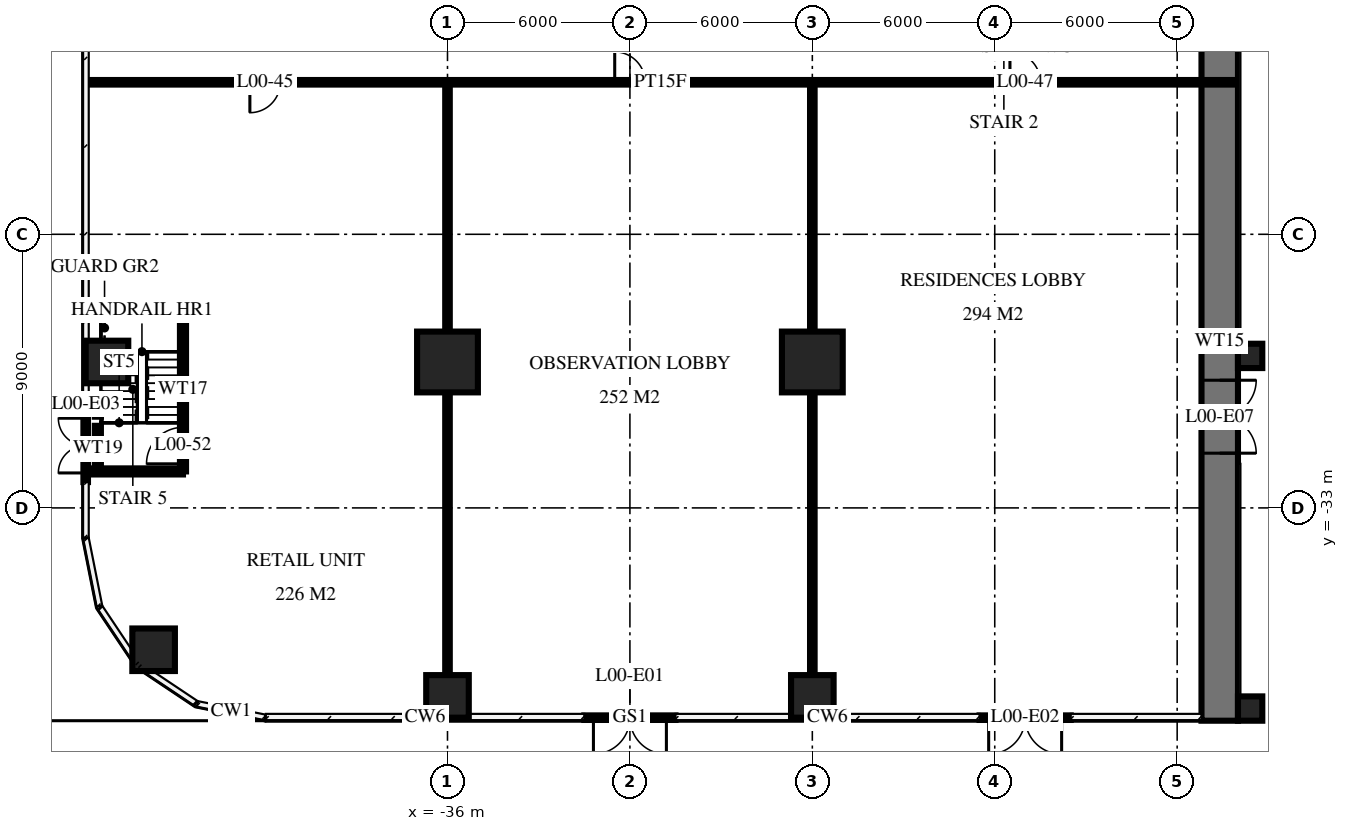
"""IFC4 building model, lengths in metres.
Left out: names, types, materials, properties, quantities, classifications, styles, units other than length and angle.
Written with IfcOpenShell. Run it as: python <this file> out.ifc"""

import sys

from ifc_helpers import new_model, si_unit, direction, frame, frame_2d, origin, origin_2d, place, context, subcontext, project, spatial, rectangle, circle, extrude, element, fill, save


model = new_model("IFC4")
c1 = context("Model", 3, precision=1e-05, world=origin(), true_north=direction((0.0, 1.0)))
c2 = subcontext(c1, "Body", "Model", "MODEL_VIEW")
j1 = project(units=[si_unit("LENGTHUNIT", "METRE"), si_unit("PLANEANGLEUNIT", "RADIAN")], contexts=[c1])
p1 = place(None, origin())
s1 = spatial("IfcSite", under=j1, at=p1, CompositionType="ELEMENT")
p2 = place(p1, origin())
s2 = spatial("IfcBuilding", under=s1, at=p2, CompositionType="ELEMENT")
p3 = place(p2, origin())
s3 = spatial("IfcBuildingStorey", under=s2, at=p3, CompositionType="ELEMENT", Elevation=0.0)
for number, where, z_axis, x_axis in (
    (1, (-47.2, -28.2, -0.3), (0.0, 0.0, 1.0), (1.0, 0.0, 0.0)),
    (2, (-45.666, -37.666, -0.3), (0.0, 0.0, 1.0), (1.0, 0.0, 0.0)),
    (3, (-36.0, -39.2, -0.3), (0.0, 0.0, 1.0), (1.0, 0.0, 0.0)),
):
    element("IfcColumn", number, at=place(p3, frame(where, z_axis=z_axis, x_axis=x_axis)), inside=s3, PredefinedType="COLUMN", context=c2, shape_type="SweptSolid", body=[
        extrude(circle(Radius=0.7, at=origin_2d()), origin(), (0.0, 0.0, 1.0), 7.3),
    ])
p4 = place(p3, frame((-36.0, -28.2, -0.3), z_axis=(0.0, 0.0, 1.0), x_axis=(1.0, 0.0, 0.0)))
e4 = element("IfcColumn", 4, at=p4, inside=s3, PredefinedType="COLUMN", context=c2, shape_type="SweptSolid", body=[
    extrude(circle(Radius=1.0, at=origin_2d()), origin(), (0.0, 0.0, 1.0), 7.3),
])
p5 = place(p3, frame((-24.0, -39.2, -0.3), z_axis=(0.0, 0.0, 1.0), x_axis=(1.0, 0.0, 0.0)))
e5 = element("IfcColumn", 5, at=p5, inside=s3, PredefinedType="COLUMN", context=c2, shape_type="SweptSolid", body=[
    extrude(circle(Radius=0.7, at=origin_2d()), origin(), (0.0, 0.0, 1.0), 7.3),
])
p6 = place(p3, frame((-24.0, -28.2, -0.3), z_axis=(0.0, 0.0, 1.0), x_axis=(1.0, 0.0, 0.0)))
e6 = element("IfcColumn", 6, at=p6, inside=s3, PredefinedType="COLUMN", context=c2, shape_type="SweptSolid", body=[
    extrude(circle(Radius=1.0, at=origin_2d()), origin(), (0.0, 0.0, 1.0), 7.3),
])
p7 = place(p3, frame((-10.6, -40.0, -0.3), z_axis=(0.0, 0.0, 1.0), x_axis=(0.0, 1.0, 0.0)))
e7 = element("IfcWall", 7, at=p7, inside=s3, PredefinedType="SHEAR", context=c2, shape_type="SweptSolid", body=[
    extrude(rectangle(XDim=25.0, YDim=1.2, at=frame_2d((12.5, 0.0))), origin(), (0.0, 0.0, 1.0), 7.3),
])
p8 = place(p7, frame((8.8, 0.0, 0.3)))
e8 = element("IfcOpeningElement", 8, at=p8, cuts=e7, PredefinedType="OPENING", context=c2, shape_type="SweptSolid", body=[
    extrude(rectangle(XDim=2.4, YDim=2.7, at=frame_2d((1.2, 1.35))), frame((0.0, 0.61, 0.0), z_axis=(0.0, -1.0, 0.0), x_axis=(1.0, 0.0, 0.0)), (0.0, 0.0, 1.0), 1.22),
])
for number, where, z_axis, x_axis in (
    (9, (-9.6, -39.6, -0.3), (0.0, 0.0, 1.0), (1.0, 0.0, 0.0)),
    (10, (-9.6, -28.0, -0.3), (0.0, 0.0, 1.0), (1.0, 0.0, 0.0)),
):
    element("IfcColumn", number, at=place(p3, frame(where, z_axis=z_axis, x_axis=x_axis)), inside=s3, PredefinedType="COLUMN", context=c2, shape_type="SweptSolid", body=[
        extrude(rectangle(XDim=0.8, YDim=0.8, at=origin_2d()), origin(), (0.0, 0.0, 1.0), 7.3),
    ])
p9 = place(p3, frame((-31.5, -39.9, 0.0), z_axis=(0.0, 0.0, 1.0), x_axis=(1.0, 0.0, 0.0)))
e11 = element("IfcWall", 11, at=p9, inside=s3, PredefinedType="USERDEFINED", context=c2, shape_type="SweptSolid", body=[
    extrude(rectangle(XDim=3.0, YDim=0.15, at=frame_2d((1.5, 0.0))), origin(), (0.0, 0.0, 1.0), 6.55),
])
p10 = place(p9, frame((0.3, 0.0, 0.0)))
e12 = element("IfcOpeningElement", 12, at=p10, cuts=e11, PredefinedType="OPENING", context=c2, shape_type="SweptSolid", body=[
    extrude(rectangle(XDim=2.4, YDim=2.7, at=frame_2d((1.2, 1.35))), frame((0.0, 0.085, 0.0), z_axis=(0.0, -1.0, 0.0), x_axis=(1.0, 0.0, 0.0)), (0.0, 0.0, 1.0), 0.17),
])
p11 = place(p3, frame((-18.5, -39.9, 0.0), z_axis=(0.0, 0.0, 1.0), x_axis=(1.0, 0.0, 0.0)))
e13 = element("IfcWall", 13, at=p11, inside=s3, PredefinedType="USERDEFINED", context=c2, shape_type="SweptSolid", body=[
    extrude(rectangle(XDim=3.0, YDim=0.15, at=frame_2d((1.5, 0.0))), origin(), (0.0, 0.0, 1.0), 6.55),
])
p12 = place(p11, frame((0.3, 0.0, 0.0)))
e14 = element("IfcOpeningElement", 14, at=p12, cuts=e13, PredefinedType="OPENING", context=c2, shape_type="SweptSolid", body=[
    extrude(rectangle(XDim=2.4, YDim=2.7, at=frame_2d((1.2, 1.35))), frame((0.0, 0.085, 0.0), z_axis=(0.0, -1.0, 0.0), x_axis=(1.0, 0.0, 0.0)), (0.0, 0.0, 1.0), 0.17),
])
p13 = place(p3, frame((-47.9, -29.75, 0.0), z_axis=(0.0, 0.0, 1.0), x_axis=(0.0, -1.0, 0.0)))
e15 = element("IfcWall", 15, at=p13, inside=s3, PredefinedType="USERDEFINED", context=c2, shape_type="SweptSolid", body=[
    extrude(rectangle(XDim=2.4, YDim=0.15, at=frame_2d((1.2, 0.0))), origin(), (0.0, 0.0, 1.0), 6.55),
])
p14 = place(p13, frame((0.3, 0.0, 0.0)))
e16 = element("IfcOpeningElement", 16, at=p14, cuts=e15, PredefinedType="OPENING", context=c2, shape_type="SweptSolid", body=[
    extrude(rectangle(XDim=1.8, YDim=2.4, at=frame_2d((0.9, 1.2))), frame((0.0, 0.085, 0.0), z_axis=(0.0, -1.0, 0.0), x_axis=(1.0, 0.0, 0.0)), (0.0, 0.0, 1.0), 0.17),
])
for number, where, z_axis, x_axis in (
    (17, (-24.0, -39.82, 0.0), (0.0, 0.0, 1.0), (0.0, 1.0, 0.0)),
    (18, (-36.0, -39.82, 0.0), (0.0, 0.0, 1.0), (0.0, 1.0, 0.0)),
):
    element("IfcWall", number, at=place(p3, frame(where, z_axis=z_axis, x_axis=x_axis)), inside=s3, PredefinedType="PARTITIONING", context=c2, shape_type="SweptSolid", body=[
        extrude(rectangle(XDim=20.82, YDim=0.15, at=frame_2d((10.41, 0.0))), origin(), (0.0, 0.0, 1.0), 6.55),
    ])
p15 = place(p3, frame((-44.7, -31.8, 0.0), z_axis=(0.0, 0.0, 1.0), x_axis=(0.0, 1.0, 0.0)))
e19 = element("IfcWall", 19, at=p15, inside=s3, PredefinedType="SHEAR", context=c2, shape_type="SweptSolid", body=[
    extrude(rectangle(XDim=5.4, YDim=0.2, at=frame_2d((2.7, 0.0))), origin(), (0.0, 0.0, 1.0), 6.55),
])
p16 = place(p15, frame((0.25, 0.0, 0.0)))
e20 = element("IfcOpeningElement", 20, at=p16, cuts=e19, PredefinedType="OPENING", context=c2, shape_type="SweptSolid", body=[
    extrude(rectangle(XDim=1.2, YDim=2.1, at=frame_2d((0.6, 1.05))), frame((0.0, 0.11, 0.0), z_axis=(0.0, -1.0, 0.0), x_axis=(1.0, 0.0, 0.0)), (0.0, 0.0, 1.0), 0.22),
])
for number, where, z_axis, x_axis in (
    (21, (-47.82, -31.8, 0.0), (0.0, 0.0, 1.0), (1.0, 0.0, 0.0)),
    (22, (-47.82, -26.4, 0.0), (0.0, 0.0, 1.0), (1.0, 0.0, 0.0)),
):
    element("IfcWall", number, at=place(p3, frame(where, z_axis=z_axis, x_axis=x_axis)), inside=s3, PredefinedType="SHEAR", context=c2, shape_type="SweptSolid", body=[
        extrude(rectangle(XDim=3.12, YDim=0.2, at=frame_2d((1.56, 0.0))), origin(), (0.0, 0.0, 1.0), 6.55),
    ])
p17 = place(p3, frame((-47.82, -19.0, 0.0), z_axis=(0.0, 0.0, 1.0), x_axis=(1.0, 0.0, 0.0)))
e23 = element("IfcWall", 23, at=p17, inside=s3, PredefinedType="PARTITIONING", context=c2, shape_type="SweptSolid", body=[
    extrude(rectangle(XDim=37.64, YDim=0.15, at=frame_2d((18.82, 0.0))), origin(), (0.0, 0.0, 1.0), 6.55),
])
p18 = place(p17, frame((5.32, 0.0, 0.0)))
e24 = element("IfcOpeningElement", 24, at=p18, cuts=e23, PredefinedType="OPENING", context=c2, shape_type="SweptSolid", body=[
    extrude(rectangle(XDim=1.0, YDim=2.1, at=frame_2d((0.5, 1.05))), frame((0.0, 0.085, 0.0), z_axis=(0.0, -1.0, 0.0), x_axis=(1.0, 0.0, 0.0)), (0.0, 0.0, 1.0), 0.17),
])
p19 = place(p17, frame((17.32, 0.0, 0.0)))
e25 = element("IfcOpeningElement", 25, at=p19, cuts=e23, PredefinedType="OPENING", context=c2, shape_type="SweptSolid", body=[
    extrude(rectangle(XDim=1.0, YDim=2.1, at=frame_2d((0.5, 1.05))), frame((0.0, 0.085, 0.0), z_axis=(0.0, -1.0, 0.0), x_axis=(1.0, 0.0, 0.0)), (0.0, 0.0, 1.0), 0.17),
])
p20 = place(p17, frame((30.32, 0.0, 0.0)))
e26 = element("IfcOpeningElement", 26, at=p20, cuts=e23, PredefinedType="OPENING", context=c2, shape_type="SweptSolid", body=[
    extrude(rectangle(XDim=1.0, YDim=2.1, at=frame_2d((0.5, 1.05))), frame((0.0, 0.085, 0.0), z_axis=(0.0, -1.0, 0.0), x_axis=(1.0, 0.0, 0.0)), (0.0, 0.0, 1.0), 0.17),
])
p21 = place(p3, frame((-47.5, -29.9, -0.3), z_axis=(0.0, 0.0, 1.0), x_axis=(1.0, 0.0, 0.0)))
e27 = element("IfcColumn", 27, at=p21, inside=s3, PredefinedType="COLUMN", context=c2, shape_type="SweptSolid", body=[
    extrude(rectangle(XDim=0.2, YDim=0.2, at=origin_2d()), origin(), (0.0, 0.0, 1.0), 2.8),
])
p22 = place(p3, frame((-47.5, -31.8, 3.3), z_axis=(0.0, 0.0, 1.0), x_axis=(0.0, 1.0, 0.0)))
e28 = element("IfcWall", 28, at=p22, inside=s3, PredefinedType="PARTITIONING", context=c2, shape_type="SweptSolid", body=[
    extrude(rectangle(XDim=1.5, YDim=0.2, at=frame_2d((0.75, 0.0))), origin(), (0.0, 0.0, 1.0), 3.25),
])
p23 = place(p10, frame((1.2, 0.0, 0.0), z_axis=(0.0, 0.0, 1.0), x_axis=(-1.0, 0.0, 0.0)))
e29 = element("IfcDoor", 29, at=p23, inside=s3, OperationType="DOUBLE_DOOR_DOUBLE_SWING", PredefinedType="DOOR", context=c2, shape_type="SweptSolid", body=[
    extrude(rectangle(XDim=2.4, YDim=2.7, at=frame_2d((0.0, 1.35))), frame((0.0, -0.025, 0.0), z_axis=(0.0, 1.0, 0.0), x_axis=(-1.0, 0.0, 0.0)), (0.0, 0.0, 1.0), 0.05),
])
fill(e12, e29)
p24 = place(p12, frame((1.2, 0.0, 0.0), z_axis=(0.0, 0.0, 1.0), x_axis=(-1.0, 0.0, 0.0)))
e30 = element("IfcDoor", 30, at=p24, inside=s3, OperationType="DOUBLE_DOOR_DOUBLE_SWING", PredefinedType="DOOR", context=c2, shape_type="SweptSolid", body=[
    extrude(rectangle(XDim=2.4, YDim=2.7, at=frame_2d((0.0, 1.35))), frame((0.0, -0.025, 0.0), z_axis=(0.0, 1.0, 0.0), x_axis=(-1.0, 0.0, 0.0)), (0.0, 0.0, 1.0), 0.05),
])
fill(e14, e30)
p25 = place(p14, frame((0.9, 0.0, 0.0), z_axis=(0.0, 0.0, 1.0), x_axis=(-1.0, 0.0, 0.0)))
e31 = element("IfcDoor", 31, at=p25, inside=s3, OperationType="DOUBLE_DOOR_SINGLE_SWING", PredefinedType="DOOR", context=c2, shape_type="SweptSolid", body=[
    extrude(rectangle(XDim=1.8, YDim=2.4, at=frame_2d((0.0, 1.2))), frame((0.0, -0.025, 0.0), z_axis=(0.0, 1.0, 0.0), x_axis=(-1.0, 0.0, 0.0)), (0.0, 0.0, 1.0), 0.05),
])
fill(e16, e31)
p26 = place(p8, frame((1.2, 0.0, 0.0), z_axis=(0.0, 0.0, 1.0), x_axis=(-1.0, 0.0, 0.0)))
e32 = element("IfcDoor", 32, at=p26, inside=s3, OperationType="DOUBLE_DOOR_DOUBLE_SWING", PredefinedType="DOOR", context=c2, shape_type="SweptSolid", body=[
    extrude(rectangle(XDim=2.4, YDim=2.7, at=frame_2d((0.0, 1.35))), frame((0.0, -0.025, 0.0), z_axis=(0.0, 1.0, 0.0), x_axis=(-1.0, 0.0, 0.0)), (0.0, 0.0, 1.0), 0.05),
])
fill(e8, e32)
p27 = place(p18, frame((0.5, 0.0, 0.0), z_axis=(0.0, 0.0, 1.0), x_axis=(-1.0, 0.0, 0.0)))
e33 = element("IfcDoor", 33, at=p27, inside=s3, OperationType="SINGLE_SWING_LEFT", PredefinedType="DOOR", context=c2, shape_type="SweptSolid", body=[
    extrude(rectangle(XDim=1.0, YDim=2.1, at=frame_2d((0.0, 1.05))), frame((0.0, -0.025, 0.0), z_axis=(0.0, 1.0, 0.0), x_axis=(-1.0, 0.0, 0.0)), (0.0, 0.0, 1.0), 0.05),
])
fill(e24, e33)
p28 = place(p19, origin())
e34 = element("IfcDoor", 34, at=p28, inside=s3, OperationType="SINGLE_SWING_RIGHT", PredefinedType="DOOR", context=c2, shape_type="SweptSolid", body=[
    extrude(rectangle(XDim=1.0, YDim=2.1, at=frame_2d((0.5, 1.05))), frame((0.0, 0.025, 0.0), z_axis=(0.0, -1.0, 0.0), x_axis=(1.0, 0.0, 0.0)), (0.0, 0.0, 1.0), 0.05),
])
fill(e25, e34)
p29 = place(p20, origin())
e35 = element("IfcDoor", 35, at=p29, inside=s3, OperationType="SINGLE_SWING_RIGHT", PredefinedType="DOOR", context=c2, shape_type="SweptSolid", body=[
    extrude(rectangle(XDim=1.0, YDim=2.1, at=frame_2d((0.5, 1.05))), frame((0.0, 0.025, 0.0), z_axis=(0.0, -1.0, 0.0), x_axis=(1.0, 0.0, 0.0)), (0.0, 0.0, 1.0), 0.05),
])
fill(e26, e35)
p30 = place(p16, origin())
e36 = element("IfcDoor", 36, at=p30, inside=s3, OperationType="SINGLE_SWING_RIGHT", PredefinedType="DOOR", context=c2, shape_type="SweptSolid", body=[
    extrude(rectangle(XDim=1.2, YDim=2.1, at=frame_2d((0.6, 1.05))), frame((0.0, 0.025, 0.0), z_axis=(0.0, -1.0, 0.0), x_axis=(1.0, 0.0, 0.0)), (0.0, 0.0, 1.0), 0.05),
])
fill(e20, e36)
save(model, sys.argv[1])
